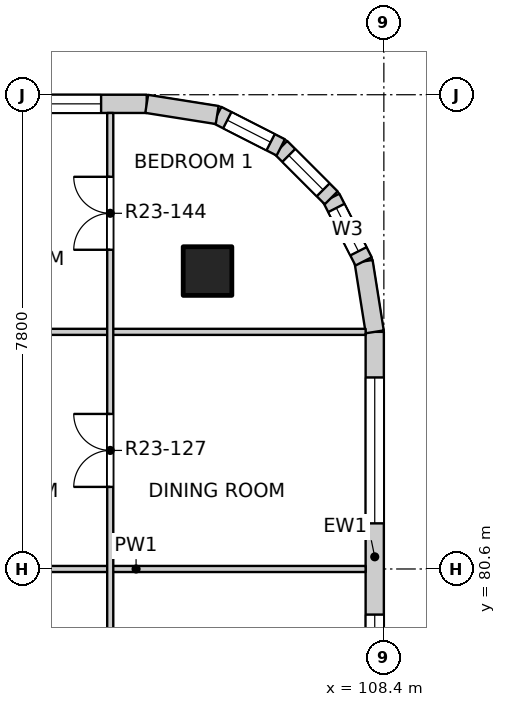
"""IFC4 building model, lengths in metres.
Left out: names, types, materials, properties, quantities, classifications, styles, units other than length and angle.
Written with IfcOpenShell. Run it as: python <this file> out.ifc"""

import sys

from ifc_helpers import new_model, si_unit, direction, frame, frame_2d, origin, origin_2d, place, context, subcontext, project, spatial, rectangle, extrude, element, fill, save


model = new_model("IFC4")
c1 = context("Model", 3, precision=1e-05, world=origin(), true_north=direction((0.0, 1.0)))
c2 = subcontext(c1, "Body", "Model", "MODEL_VIEW")
j1 = project(units=[si_unit("LENGTHUNIT", "METRE"), si_unit("PLANEANGLEUNIT", "RADIAN")], contexts=[c1])
p1 = place(None, origin())
s1 = spatial("IfcSite", under=j1, at=p1, CompositionType="ELEMENT")
p2 = place(p1, origin())
s2 = spatial("IfcBuilding", under=s1, at=p2, CompositionType="ELEMENT")
p3 = place(p2, frame((0.0, 0.0, 238.1)))
s3 = spatial("IfcBuildingStorey", under=s2, at=p3, CompositionType="ELEMENT", Elevation=238.1)
p4 = place(p3, frame((105.5, 85.5, -0.25), z_axis=(0.0, 0.0, 1.0), x_axis=(1.0, 0.0, 0.0)))
e1 = element("IfcColumn", 1, at=p4, inside=s3, PredefinedType="COLUMN", context=c2, shape_type="SweptSolid", body=[
    extrude(rectangle(XDim=0.8, YDim=0.8, at=origin_2d()), origin(), (0.0, 0.0, 1.0), 3.35),
])
p5 = place(p3, frame((108.25, 77.1, 0.0), z_axis=(0.0, 0.0, 1.0), x_axis=(0.0, 1.0, 0.0)))
e2 = element("IfcWall", 2, at=p5, inside=s3, PredefinedType="SOLIDWALL", context=c2, shape_type="SweptSolid", body=[
    extrude(rectangle(XDim=7.4, YDim=0.3, at=frame_2d((3.7, 0.0))), origin(), (0.0, 0.0, 1.0), 3.1),
])
p6 = place(p5, frame((0.35, 0.0, 0.9)))
e3 = element("IfcOpeningElement", 3, at=p6, cuts=e2, PredefinedType="OPENING", context=c2, shape_type="SweptSolid", body=[
    extrude(rectangle(XDim=2.4, YDim=1.8, at=frame_2d((1.2, 0.9))), frame((0.0, 0.16, 0.0), z_axis=(0.0, -1.0, 0.0), x_axis=(1.0, 0.0, 0.0)), (0.0, 0.0, 1.0), 0.32),
])
p7 = place(p5, frame((4.25, 0.0, 0.9)))
e4 = element("IfcOpeningElement", 4, at=p7, cuts=e2, PredefinedType="OPENING", context=c2, shape_type="SweptSolid", body=[
    extrude(rectangle(XDim=2.4, YDim=1.8, at=frame_2d((1.2, 0.9))), frame((0.0, 0.16, 0.0), z_axis=(0.0, -1.0, 0.0), x_axis=(1.0, 0.0, 0.0)), (0.0, 0.0, 1.0), 0.32),
])
p8 = place(p3, frame((97.1, 88.25, 0.0), z_axis=(0.0, 0.0, 1.0), x_axis=(1.0, 0.0, 0.0)))
e5 = element("IfcWall", 5, at=p8, inside=s3, PredefinedType="SOLIDWALL", context=c2, shape_type="SweptSolid", body=[
    extrude(rectangle(XDim=7.4, YDim=0.3, at=frame_2d((3.7, 0.0))), origin(), (0.0, 0.0, 1.0), 3.1),
])
p9 = place(p8, frame((0.35, 0.0, 0.9)))
e6 = element("IfcOpeningElement", 6, at=p9, cuts=e5, PredefinedType="OPENING", context=c2, shape_type="SweptSolid", body=[
    extrude(rectangle(XDim=2.4, YDim=1.8, at=frame_2d((1.2, 0.9))), frame((0.0, 0.16, 0.0), z_axis=(0.0, -1.0, 0.0), x_axis=(1.0, 0.0, 0.0)), (0.0, 0.0, 1.0), 0.32),
])
p10 = place(p8, frame((4.25, 0.0, 0.9)))
e7 = element("IfcOpeningElement", 7, at=p10, cuts=e5, PredefinedType="OPENING", context=c2, shape_type="SweptSolid", body=[
    extrude(rectangle(XDim=2.4, YDim=1.8, at=frame_2d((1.2, 0.9))), frame((0.0, 0.16, 0.0), z_axis=(0.0, -1.0, 0.0), x_axis=(1.0, 0.0, 0.0)), (0.0, 0.0, 1.0), 0.32),
])
p11 = place(p3, frame((108.25, 84.5, 0.0), z_axis=(0.0, 0.0, 1.0), x_axis=(-0.156496880861, 0.987678452879, 0.0)))
e8 = element("IfcWall", 8, at=p11, inside=s3, PredefinedType="SOLIDWALL", context=c2, shape_type="SweptSolid", body=[
    extrude(rectangle(XDim=1.173, YDim=0.3, at=frame_2d((0.586, 0.0))), origin(), (0.0, 0.0, 1.0), 3.1),
])
p12 = place(p3, frame((108.066, 85.659, 0.0), z_axis=(0.0, 0.0, 1.0), x_axis=(-0.454025524128, 0.890988677504, 0.0)))
e9 = element("IfcWall", 9, at=p12, inside=s3, PredefinedType="SOLIDWALL", context=c2, shape_type="SweptSolid", body=[
    extrude(rectangle(XDim=1.173, YDim=0.3, at=frame_2d((0.587, 0.0))), origin(), (0.0, 0.0, 1.0), 3.1),
])
p13 = place(p12, frame((0.187, 0.0, 0.9)))
e10 = element("IfcOpeningElement", 10, at=p13, cuts=e9, PredefinedType="OPENING", context=c2, shape_type="SweptSolid", body=[
    extrude(rectangle(XDim=0.8, YDim=1.2, at=frame_2d((0.4, 0.6))), frame((0.0, 0.16, 0.0), z_axis=(0.0, -1.0, 0.0), x_axis=(1.0, 0.0, 0.0)), (0.0, 0.0, 1.0), 0.32),
])
p14 = place(p3, frame((107.534, 86.704, 0.0), z_axis=(0.0, 0.0, 1.0), x_axis=(-0.707106781187, 0.707106781187, 0.0)))
e11 = element("IfcWall", 11, at=p14, inside=s3, PredefinedType="SOLIDWALL", context=c2, shape_type="SweptSolid", body=[
    extrude(rectangle(XDim=1.173, YDim=0.3, at=frame_2d((0.586, 0.0))), origin(), (0.0, 0.0, 1.0), 3.1),
])
p15 = place(p14, frame((0.187, 0.0, 0.9)))
e12 = element("IfcOpeningElement", 12, at=p15, cuts=e11, PredefinedType="OPENING", context=c2, shape_type="SweptSolid", body=[
    extrude(rectangle(XDim=0.8, YDim=1.2, at=frame_2d((0.4, 0.6))), frame((0.0, 0.16, 0.0), z_axis=(0.0, -1.0, 0.0), x_axis=(1.0, 0.0, 0.0)), (0.0, 0.0, 1.0), 0.32),
])
p16 = place(p3, frame((106.704, 87.534, 0.0), z_axis=(0.0, 0.0, 1.0), x_axis=(-0.890988677504, 0.454025524128, 0.0)))
e13 = element("IfcWall", 13, at=p16, inside=s3, PredefinedType="SOLIDWALL", context=c2, shape_type="SweptSolid", body=[
    extrude(rectangle(XDim=1.173, YDim=0.3, at=frame_2d((0.587, 0.0))), origin(), (0.0, 0.0, 1.0), 3.1),
])
p17 = place(p16, frame((0.187, 0.0, 0.9)))
e14 = element("IfcOpeningElement", 14, at=p17, cuts=e13, PredefinedType="OPENING", context=c2, shape_type="SweptSolid", body=[
    extrude(rectangle(XDim=0.8, YDim=1.2, at=frame_2d((0.4, 0.6))), frame((0.0, 0.16, 0.0), z_axis=(0.0, -1.0, 0.0), x_axis=(1.0, 0.0, 0.0)), (0.0, 0.0, 1.0), 0.32),
])
p18 = place(p3, frame((105.659, 88.066, 0.0), z_axis=(0.0, 0.0, 1.0), x_axis=(-0.987678452879, 0.156496880861, 0.0)))
e15 = element("IfcWall", 15, at=p18, inside=s3, PredefinedType="SOLIDWALL", context=c2, shape_type="SweptSolid", body=[
    extrude(rectangle(XDim=1.173, YDim=0.3, at=frame_2d((0.586, 0.0))), origin(), (0.0, 0.0, 1.0), 3.1),
])
p19 = place(p3, frame((100.55, 80.6, 0.0), z_axis=(0.0, 0.0, 1.0), x_axis=(1.0, 0.0, 0.0)))
e16 = element("IfcWall", 16, at=p19, inside=s3, PredefinedType="PARTITIONING", context=c2, shape_type="SweptSolid", body=[
    extrude(rectangle(XDim=7.55, YDim=0.1, at=frame_2d((3.775, 0.0))), origin(), (0.0, 0.0, 1.0), 3.1),
])
p20 = place(p3, frame((96.6, 84.5, 0.0), z_axis=(0.0, 0.0, 1.0), x_axis=(1.0, 0.0, 0.0)))
e17 = element("IfcWall", 17, at=p20, inside=s3, PredefinedType="PARTITIONING", context=c2, shape_type="SweptSolid", body=[
    extrude(rectangle(XDim=11.5, YDim=0.1, at=frame_2d((5.75, 0.0))), origin(), (0.0, 0.0, 1.0), 3.1),
])
p21 = place(p20, frame((2.635, 0.0, 0.0)))
e18 = element("IfcOpeningElement", 18, at=p21, cuts=e17, PredefinedType="OPENING", context=c2, shape_type="SweptSolid", body=[
    extrude(rectangle(XDim=0.9, YDim=2.1, at=frame_2d((0.45, 1.05))), frame((0.0, 0.06, 0.0), z_axis=(0.0, -1.0, 0.0), x_axis=(1.0, 0.0, 0.0)), (0.0, 0.0, 1.0), 0.12),
])
p22 = place(p3, frame((103.9, 61.2, 0.0), z_axis=(0.0, 0.0, 1.0), x_axis=(0.0, 1.0, 0.0)))
e19 = element("IfcWall", 19, at=p22, inside=s3, PredefinedType="PARTITIONING", context=c2, shape_type="SweptSolid", body=[
    extrude(rectangle(XDim=26.9, YDim=0.1, at=frame_2d((13.45, 0.0))), origin(), (0.0, 0.0, 1.0), 3.1),
])
p23 = place(p22, frame((0.425, 0.0, 0.0)))
e20 = element("IfcOpeningElement", 20, at=p23, cuts=e19, PredefinedType="OPENING", context=c2, shape_type="SweptSolid", body=[
    extrude(rectangle(XDim=0.9, YDim=2.1, at=frame_2d((0.45, 1.05))), frame((0.0, 0.06, 0.0), z_axis=(0.0, -1.0, 0.0), x_axis=(1.0, 0.0, 0.0)), (0.0, 0.0, 1.0), 0.12),
])
p24 = place(p22, frame((2.375, 0.0, 0.0)))
e21 = element("IfcOpeningElement", 21, at=p24, cuts=e19, PredefinedType="OPENING", context=c2, shape_type="SweptSolid", body=[
    extrude(rectangle(XDim=0.9, YDim=2.1, at=frame_2d((0.45, 1.05))), frame((0.0, 0.06, 0.0), z_axis=(0.0, -1.0, 0.0), x_axis=(1.0, 0.0, 0.0)), (0.0, 0.0, 1.0), 0.12),
])
p25 = place(p22, frame((4.325, 0.0, 0.0)))
e22 = element("IfcOpeningElement", 22, at=p25, cuts=e19, PredefinedType="OPENING", context=c2, shape_type="SweptSolid", body=[
    extrude(rectangle(XDim=0.9, YDim=2.1, at=frame_2d((0.45, 1.05))), frame((0.0, 0.06, 0.0), z_axis=(0.0, -1.0, 0.0), x_axis=(1.0, 0.0, 0.0)), (0.0, 0.0, 1.0), 0.12),
])
p26 = place(p22, frame((6.275, 0.0, 0.0)))
e23 = element("IfcOpeningElement", 23, at=p26, cuts=e19, PredefinedType="OPENING", context=c2, shape_type="SweptSolid", body=[
    extrude(rectangle(XDim=0.9, YDim=2.1, at=frame_2d((0.45, 1.05))), frame((0.0, 0.06, 0.0), z_axis=(0.0, -1.0, 0.0), x_axis=(1.0, 0.0, 0.0)), (0.0, 0.0, 1.0), 0.12),
])
p27 = place(p22, frame((9.05, 0.0, 0.0)))
e24 = element("IfcOpeningElement", 24, at=p27, cuts=e19, PredefinedType="OPENING", context=c2, shape_type="SweptSolid", body=[
    extrude(rectangle(XDim=1.2, YDim=2.1, at=frame_2d((0.6, 1.05))), frame((0.0, 0.06, 0.0), z_axis=(0.0, -1.0, 0.0), x_axis=(1.0, 0.0, 0.0)), (0.0, 0.0, 1.0), 0.12),
])
p28 = place(p22, frame((12.125, 0.0, 0.0)))
e25 = element("IfcOpeningElement", 25, at=p28, cuts=e19, PredefinedType="OPENING", context=c2, shape_type="SweptSolid", body=[
    extrude(rectangle(XDim=0.9, YDim=2.1, at=frame_2d((0.45, 1.05))), frame((0.0, 0.06, 0.0), z_axis=(0.0, -1.0, 0.0), x_axis=(1.0, 0.0, 0.0)), (0.0, 0.0, 1.0), 0.12),
])
p29 = place(p22, frame((14.075, 0.0, 0.0)))
e26 = element("IfcOpeningElement", 26, at=p29, cuts=e19, PredefinedType="OPENING", context=c2, shape_type="SweptSolid", body=[
    extrude(rectangle(XDim=0.9, YDim=2.1, at=frame_2d((0.45, 1.05))), frame((0.0, 0.06, 0.0), z_axis=(0.0, -1.0, 0.0), x_axis=(1.0, 0.0, 0.0)), (0.0, 0.0, 1.0), 0.12),
])
p30 = place(p22, frame((16.85, 0.0, 0.0)))
e27 = element("IfcOpeningElement", 27, at=p30, cuts=e19, PredefinedType="OPENING", context=c2, shape_type="SweptSolid", body=[
    extrude(rectangle(XDim=1.2, YDim=2.1, at=frame_2d((0.6, 1.05))), frame((0.0, 0.06, 0.0), z_axis=(0.0, -1.0, 0.0), x_axis=(1.0, 0.0, 0.0)), (0.0, 0.0, 1.0), 0.12),
])
p31 = place(p22, frame((20.75, 0.0, 0.0)))
e28 = element("IfcOpeningElement", 28, at=p31, cuts=e19, PredefinedType="OPENING", context=c2, shape_type="SweptSolid", body=[
    extrude(rectangle(XDim=1.2, YDim=2.1, at=frame_2d((0.6, 1.05))), frame((0.0, 0.06, 0.0), z_axis=(0.0, -1.0, 0.0), x_axis=(1.0, 0.0, 0.0)), (0.0, 0.0, 1.0), 0.12),
])
p32 = place(p22, frame((24.65, 0.0, 0.0)))
e29 = element("IfcOpeningElement", 29, at=p32, cuts=e19, PredefinedType="OPENING", context=c2, shape_type="SweptSolid", body=[
    extrude(rectangle(XDim=1.2, YDim=2.1, at=frame_2d((0.6, 1.05))), frame((0.0, 0.06, 0.0), z_axis=(0.0, -1.0, 0.0), x_axis=(1.0, 0.0, 0.0)), (0.0, 0.0, 1.0), 0.12),
])
p33 = place(p6, origin())
e30 = element("IfcWindow", 30, at=p33, inside=s3, PartitioningType="DOUBLE_PANEL_VERTICAL", PredefinedType="WINDOW", context=c2, shape_type="SweptSolid", body=[
    extrude(rectangle(XDim=2.4, YDim=1.8, at=frame_2d((1.2, 0.9))), frame((0.0, 0.03, 0.0), z_axis=(0.0, -1.0, 0.0), x_axis=(1.0, 0.0, 0.0)), (0.0, 0.0, 1.0), 0.06),
])
fill(e3, e30)
p34 = place(p7, origin())
e31 = element("IfcWindow", 31, at=p34, inside=s3, PartitioningType="DOUBLE_PANEL_VERTICAL", PredefinedType="WINDOW", context=c2, shape_type="SweptSolid", body=[
    extrude(rectangle(XDim=2.4, YDim=1.8, at=frame_2d((1.2, 0.9))), frame((0.0, 0.03, 0.0), z_axis=(0.0, -1.0, 0.0), x_axis=(1.0, 0.0, 0.0)), (0.0, 0.0, 1.0), 0.06),
])
fill(e4, e31)
p35 = place(p10, origin())
e32 = element("IfcWindow", 32, at=p35, inside=s3, PartitioningType="DOUBLE_PANEL_VERTICAL", PredefinedType="WINDOW", context=c2, shape_type="SweptSolid", body=[
    extrude(rectangle(XDim=2.4, YDim=1.8, at=frame_2d((1.2, 0.9))), frame((0.0, 0.03, 0.0), z_axis=(0.0, -1.0, 0.0), x_axis=(1.0, 0.0, 0.0)), (0.0, 0.0, 1.0), 0.06),
])
fill(e7, e32)
p36 = place(p13, origin())
e33 = element("IfcWindow", 33, at=p36, inside=s3, PartitioningType="SINGLE_PANEL", PredefinedType="WINDOW", context=c2, shape_type="SweptSolid", body=[
    extrude(rectangle(XDim=0.8, YDim=1.2, at=frame_2d((0.4, 0.6))), frame((0.0, 0.03, 0.0), z_axis=(0.0, -1.0, 0.0), x_axis=(1.0, 0.0, 0.0)), (0.0, 0.0, 1.0), 0.06),
])
fill(e10, e33)
p37 = place(p15, origin())
e34 = element("IfcWindow", 34, at=p37, inside=s3, PartitioningType="SINGLE_PANEL", PredefinedType="WINDOW", context=c2, shape_type="SweptSolid", body=[
    extrude(rectangle(XDim=0.8, YDim=1.2, at=frame_2d((0.4, 0.6))), frame((0.0, 0.03, 0.0), z_axis=(0.0, -1.0, 0.0), x_axis=(1.0, 0.0, 0.0)), (0.0, 0.0, 1.0), 0.06),
])
fill(e12, e34)
p38 = place(p17, origin())
e35 = element("IfcWindow", 35, at=p38, inside=s3, PartitioningType="SINGLE_PANEL", PredefinedType="WINDOW", context=c2, shape_type="SweptSolid", body=[
    extrude(rectangle(XDim=0.8, YDim=1.2, at=frame_2d((0.4, 0.6))), frame((0.0, 0.03, 0.0), z_axis=(0.0, -1.0, 0.0), x_axis=(1.0, 0.0, 0.0)), (0.0, 0.0, 1.0), 0.06),
])
fill(e14, e35)
p39 = place(p31, origin())
e36 = element("IfcDoor", 36, at=p39, inside=s3, OperationType="DOUBLE_DOOR_SINGLE_SWING", PredefinedType="DOOR", context=c2, shape_type="SweptSolid", body=[
    extrude(rectangle(XDim=1.2, YDim=2.1, at=frame_2d((0.6, 1.05))), frame((0.0, 0.025, 0.0), z_axis=(0.0, -1.0, 0.0), x_axis=(1.0, 0.0, 0.0)), (0.0, 0.0, 1.0), 0.05),
])
fill(e28, e36)
p40 = place(p32, origin())
e37 = element("IfcDoor", 37, at=p40, inside=s3, OperationType="DOUBLE_DOOR_SINGLE_SWING", PredefinedType="DOOR", context=c2, shape_type="SweptSolid", body=[
    extrude(rectangle(XDim=1.2, YDim=2.1, at=frame_2d((0.6, 1.05))), frame((0.0, 0.025, 0.0), z_axis=(0.0, -1.0, 0.0), x_axis=(1.0, 0.0, 0.0)), (0.0, 0.0, 1.0), 0.05),
])
fill(e29, e37)
save(model, sys.argv[1])
